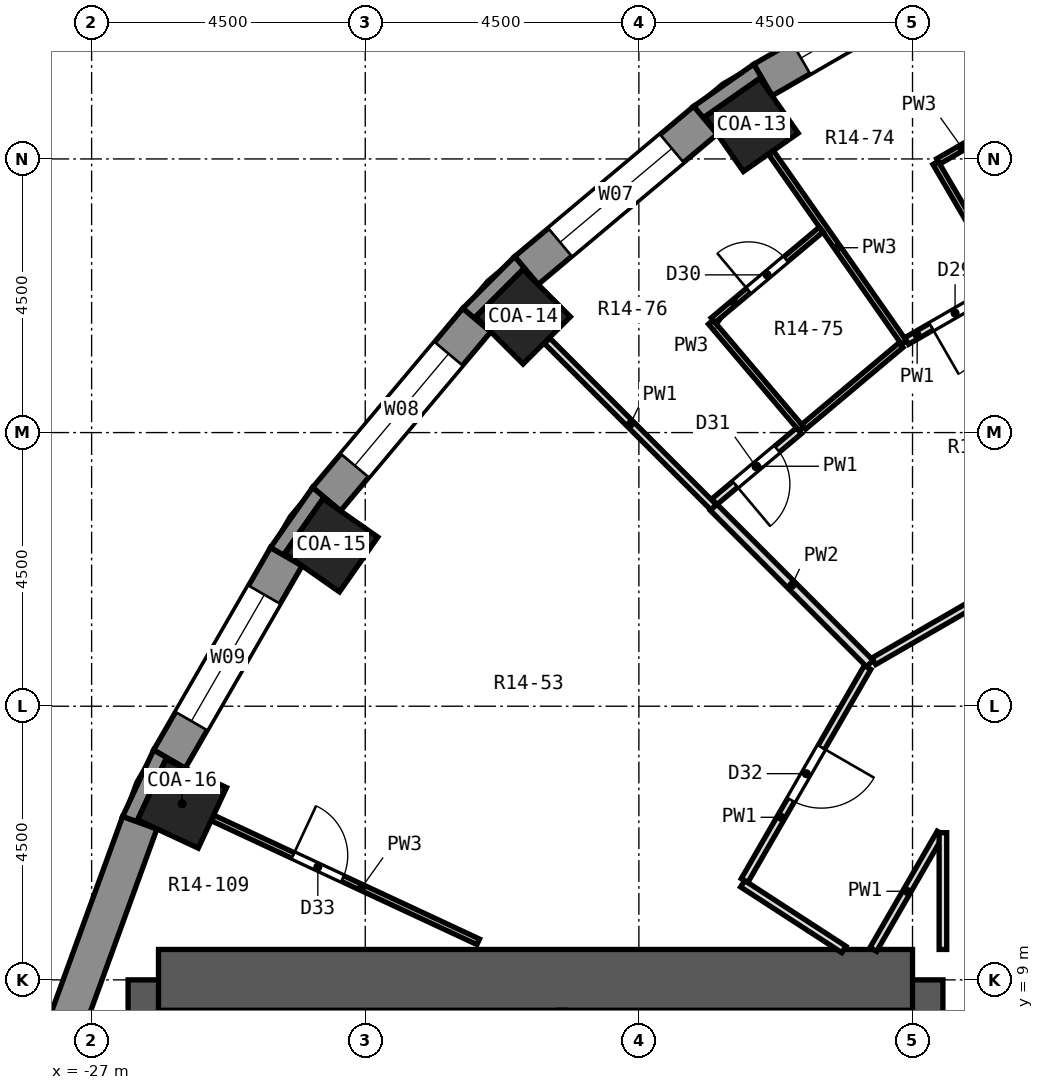
"""IFC4 building model, lengths in metres.
Left out: names, types, materials, properties, quantities, classifications, styles, units other than length and angle.
Written with IfcOpenShell. Run it as: python <this file> out.ifc"""

import sys

from ifc_helpers import new_model, si_unit, direction, frame, frame_2d, origin, origin_2d, place, context, subcontext, project, spatial, polyline, rectangle, outline, extrude, element, fill, save


model = new_model("IFC4")
c1 = context("Model", 3, precision=1e-05, world=origin(), true_north=direction((0.0, 1.0)))
c2 = subcontext(c1, "Body", "Model", "MODEL_VIEW")
j1 = project(units=[si_unit("LENGTHUNIT", "METRE"), si_unit("PLANEANGLEUNIT", "RADIAN")], contexts=[c1])
p1 = place(None, origin())
s1 = spatial("IfcSite", under=j1, at=p1, CompositionType="ELEMENT")
p2 = place(p1, origin())
s2 = spatial("IfcBuilding", under=s1, at=p2, CompositionType="ELEMENT")
p3 = place(p2, frame((0.0, 0.0, 75.8)))
s3 = spatial("IfcBuildingStorey", under=s2, at=p3, CompositionType="ELEMENT", Elevation=75.8)
for number, where, z_axis, x_axis in (
    (1, (-16.146, 23.059, 0.0), (0.0, 0.0, 1.0), (-0.574, 0.819, 0.0)),
    (2, (-19.905, 19.905, 0.0), (0.0, 0.0, 1.0), (-0.707, 0.707, 0.0)),
    (3, (-23.059, 16.146, 0.0), (0.0, 0.0, 1.0), (-0.819, 0.574, 0.0)),
    (4, (-25.512, 11.897, 0.0), (0.0, 0.0, 1.0), (-0.906, 0.423, 0.0)),
):
    element("IfcColumn", number, at=place(p3, frame(where, z_axis=z_axis, x_axis=x_axis)), inside=s3, PredefinedType="COLUMN", context=c2, shape_type="SweptSolid", body=[
        extrude(rectangle(XDim=1.1, YDim=1.1, at=origin_2d()), origin(), (0.0, 0.0, 1.0), 3.3),
    ])
p4 = place(p3, frame((-13.5, -9.0, 0.0), z_axis=(0.0, 0.0, 1.0), x_axis=(0.0, 1.0, 0.0)))
e5 = element("IfcWall", 5, at=p4, inside=s3, PredefinedType="SHEAR", context=c2, shape_type="SweptSolid", body=[
    extrude(rectangle(XDim=18.0, YDim=1.0, at=frame_2d((9.0, 0.0))), origin(), (0.0, 0.0, 1.0), 3.3),
])
p5 = place(p4, frame((15.4, 0.0, 0.0)))
e6 = element("IfcOpeningElement", 6, at=p5, cuts=e5, PredefinedType="OPENING", context=c2, shape_type="SweptSolid", body=[
    extrude(rectangle(XDim=1.2, YDim=2.1, at=frame_2d((0.6, 1.05))), frame((0.0, 0.512, 0.0), z_axis=(0.0, -1.0, 0.0), x_axis=(1.0, 0.0, 0.0)), (0.0, 0.0, 1.0), 1.024),
])
p6 = place(p4, frame((1.4, 0.0, 0.0)))
e7 = element("IfcOpeningElement", 7, at=p6, cuts=e5, PredefinedType="OPENING", context=c2, shape_type="SweptSolid", body=[
    extrude(rectangle(XDim=1.2, YDim=2.1, at=frame_2d((0.6, 1.05))), frame((0.0, 0.512, 0.0), z_axis=(0.0, -1.0, 0.0), x_axis=(1.0, 0.0, 0.0)), (0.0, 0.0, 1.0), 1.024),
])
p7 = place(p4, frame((7.5, 0.0, 0.0)))
e8 = element("IfcOpeningElement", 8, at=p7, cuts=e5, PredefinedType="OPENING", context=c2, shape_type="SweptSolid", body=[
    extrude(rectangle(XDim=3.0, YDim=2.4, at=frame_2d((1.5, 1.2))), frame((0.0, 0.512, 0.0), z_axis=(0.0, -1.0, 0.0), x_axis=(1.0, 0.0, 0.0)), (0.0, 0.0, 1.0), 1.024),
])
p8 = place(p3, frame((-25.9, -9.0, 0.0), z_axis=(0.0, 0.0, 1.0), x_axis=(0.0, 1.0, 0.0)))
e9 = element("IfcWall", 9, at=p8, inside=s3, PredefinedType="SHEAR", context=c2, shape_type="SweptSolid", body=[
    extrude(rectangle(XDim=18.0, YDim=1.0, at=frame_2d((9.0, 0.0))), origin(), (0.0, 0.0, 1.0), 3.3),
])
p9 = place(p3, frame((-13.5, 9.0, 0.0), z_axis=(0.0, 0.0, 1.0), x_axis=(-1.0, 0.0, 0.0)))
e10 = element("IfcWall", 10, at=p9, inside=s3, PredefinedType="SHEAR", context=c2, shape_type="SweptSolid", body=[
    extrude(rectangle(XDim=12.4, YDim=1.0, at=frame_2d((6.2, 0.0))), origin(), (0.0, 0.0, 1.0), 3.3),
])
p10 = place(p3, frame((-12.63, 25.721, 0.0), z_axis=(0.0, 0.0, 1.0), x_axis=(-0.86603124159, -0.499989888488, 0.0)))
e11 = element("IfcWall", 11, at=p10, inside=s3, PredefinedType="SOLIDWALL", context=c2, shape_type="SweptSolid", body=[
    extrude(rectangle(XDim=3.846, YDim=0.6, at=frame_2d((1.923, 0.0))), origin(), (0.0, 0.0, 1.0), 2.75),
])
p11 = place(p10, frame((0.723, 0.0, 0.9)))
e12 = element("IfcOpeningElement", 12, at=p11, cuts=e11, PredefinedType="OPENING", context=c2, shape_type="SweptSolid", body=[
    extrude(rectangle(XDim=2.4, YDim=1.8, at=frame_2d((1.2, 0.9))), frame((0.0, 0.312, 0.0), z_axis=(0.0, -1.0, 0.0), x_axis=(1.0, 0.0, 0.0)), (0.0, 0.0, 1.0), 0.624),
])
p12 = place(p3, frame((-16.904, 23.137, 0.0), z_axis=(0.0, 0.0, 1.0), x_axis=(-0.766026164483, -0.642809392687, 0.0)))
e13 = element("IfcWall", 13, at=p12, inside=s3, PredefinedType="SOLIDWALL", context=c2, shape_type="SweptSolid", body=[
    extrude(rectangle(XDim=3.846, YDim=0.6, at=frame_2d((1.923, 0.0))), origin(), (0.0, 0.0, 1.0), 2.75),
])
p13 = place(p12, frame((0.723, 0.0, 0.9)))
e14 = element("IfcOpeningElement", 14, at=p13, cuts=e13, PredefinedType="OPENING", context=c2, shape_type="SweptSolid", body=[
    extrude(rectangle(XDim=2.4, YDim=1.8, at=frame_2d((1.2, 0.9))), frame((0.0, 0.312, 0.0), z_axis=(0.0, -1.0, 0.0), x_axis=(1.0, 0.0, 0.0)), (0.0, 0.0, 1.0), 0.624),
])
p14 = place(p3, frame((-20.665, 19.85, 0.0), z_axis=(0.0, 0.0, 1.0), x_axis=(-0.642809392687, -0.766026164483, 0.0)))
e15 = element("IfcWall", 15, at=p14, inside=s3, PredefinedType="SOLIDWALL", context=c2, shape_type="SweptSolid", body=[
    extrude(rectangle(XDim=3.846, YDim=0.6, at=frame_2d((1.923, 0.0))), origin(), (0.0, 0.0, 1.0), 2.75),
])
p15 = place(p14, frame((0.723, 0.0, 0.9)))
e16 = element("IfcOpeningElement", 16, at=p15, cuts=e15, PredefinedType="OPENING", context=c2, shape_type="SweptSolid", body=[
    extrude(rectangle(XDim=2.4, YDim=1.8, at=frame_2d((1.2, 0.9))), frame((0.0, 0.312, 0.0), z_axis=(0.0, -1.0, 0.0), x_axis=(1.0, 0.0, 0.0)), (0.0, 0.0, 1.0), 0.624),
])
p16 = place(p3, frame((-23.798, 15.96, 0.0), z_axis=(0.0, 0.0, 1.0), x_axis=(-0.499989888488, -0.86603124159, 0.0)))
e17 = element("IfcWall", 17, at=p16, inside=s3, PredefinedType="SOLIDWALL", context=c2, shape_type="SweptSolid", body=[
    extrude(rectangle(XDim=3.846, YDim=0.6, at=frame_2d((1.923, 0.0))), origin(), (0.0, 0.0, 1.0), 2.75),
])
p17 = place(p16, frame((0.723, 0.0, 0.9)))
e18 = element("IfcOpeningElement", 18, at=p17, cuts=e17, PredefinedType="OPENING", context=c2, shape_type="SweptSolid", body=[
    extrude(rectangle(XDim=2.4, YDim=1.8, at=frame_2d((1.2, 0.9))), frame((0.0, 0.312, 0.0), z_axis=(0.0, -1.0, 0.0), x_axis=(1.0, 0.0, 0.0)), (0.0, 0.0, 1.0), 0.624),
])
p18 = place(p3, frame((-26.208, 11.585, 0.0), z_axis=(0.0, 0.0, 1.0), x_axis=(-0.342028474173, -0.939689588564, 0.0)))
e19 = element("IfcWall", 19, at=p18, inside=s3, PredefinedType="SOLIDWALL", context=c2, shape_type="SweptSolid", body=[
    extrude(rectangle(XDim=3.846, YDim=0.6, at=frame_2d((1.923, 0.0))), origin(), (0.0, 0.0, 1.0), 2.75),
])
p19 = place(p3, origin())
e20 = element("IfcWall", 20, at=p19, inside=s3, PredefinedType="SOLIDWALL", context=c2, shape_type="SweptSolid", body=[
    extrude(outline(polyline([(-16.11, 24.058), (-17.097, 23.367), (-16.711, 22.907), (-16.912, 23.194), (-16.011, 23.825), (-15.81, 23.538), (-16.11, 24.058)])), origin(), (0.0, 0.0, 1.0), 2.75),
])
p20 = place(p3, origin())
e21 = element("IfcWall", 21, at=p20, inside=s3, PredefinedType="SOLIDWALL", context=c2, shape_type="SweptSolid", body=[
    extrude(outline(polyline([(-20.895, 20.043), (-20.435, 19.657), (-20.683, 19.905), (-19.905, 20.683), (-19.657, 20.435), (-20.043, 20.895), (-20.895, 20.043)])), origin(), (0.0, 0.0, 1.0), 2.75),
])
p21 = place(p3, origin())
e22 = element("IfcWall", 22, at=p21, inside=s3, PredefinedType="SOLIDWALL", context=c2, shape_type="SweptSolid", body=[
    extrude(outline(polyline([(-23.367, 17.097), (-24.058, 16.11), (-23.538, 15.81), (-23.825, 16.011), (-23.194, 16.912), (-22.907, 16.711), (-23.367, 17.097)])), origin(), (0.0, 0.0, 1.0), 2.75),
])
p22 = place(p3, origin())
e23 = element("IfcWall", 23, at=p22, inside=s3, PredefinedType="SOLIDWALL", context=c2, shape_type="SweptSolid", body=[
    extrude(outline(polyline([(-26.49, 11.688), (-25.926, 11.483), (-26.243, 11.631), (-25.779, 12.628), (-25.461, 12.479), (-25.981, 12.78), (-26.49, 11.688)])), origin(), (0.0, 0.0, 1.0), 2.75),
])
p23 = place(p3, frame((-13.121, 22.435, 0.0), z_axis=(0.0, 0.0, 1.0), x_axis=(0.504708754908, -0.863289680651, 0.0)))
e24 = element("IfcWall", 24, at=p23, inside=s3, PredefinedType="PARTITIONING", context=c2, shape_type="SweptSolid", body=[
    extrude(rectangle(XDim=2.301, YDim=0.1, at=frame_2d((1.15, 0.0))), origin(), (0.0, 0.0, 1.0), 2.75),
])
p24 = place(p3, frame((-15.825, 22.601, 0.0), z_axis=(0.0, 0.0, 1.0), x_axis=(0.573574167811, -0.819153632733, 0.0)))
e25 = element("IfcWall", 25, at=p24, inside=s3, PredefinedType="PARTITIONING", context=c2, shape_type="SweptSolid", body=[
    extrude(rectangle(XDim=3.81, YDim=0.1, at=frame_2d((1.905, 0.0))), origin(), (0.0, 0.0, 1.0), 2.75),
])
p25 = place(p3, frame((-16.817, 19.816, 0.0), z_axis=(0.0, 0.0, 1.0), x_axis=(0.646883930741, -0.762588473653, 0.0)))
e26 = element("IfcWall", 26, at=p25, inside=s3, PredefinedType="PARTITIONING", context=c2, shape_type="SweptSolid", body=[
    extrude(rectangle(XDim=2.3, YDim=0.1, at=frame_2d((1.15, 0.0))), origin(), (0.0, 0.0, 1.0), 2.75),
])
p26 = place(p3, frame((-19.509, 19.509, 0.0), z_axis=(0.0, 0.0, 1.0), x_axis=(0.707106781187, -0.707106781187, 0.0)))
e27 = element("IfcWall", 27, at=p26, inside=s3, PredefinedType="PARTITIONING", context=c2, shape_type="SweptSolid", body=[
    extrude(rectangle(XDim=3.873, YDim=0.125, at=frame_2d((1.936, 0.0))), origin(), (0.0, 0.0, 1.0), 2.75),
])
p27 = place(p3, frame((-16.771, 16.771, 0.0), z_axis=(0.0, 0.0, 1.0), x_axis=(0.707106781187, -0.707106781187, 0.0)))
e28 = element("IfcWall", 28, at=p27, inside=s3, PredefinedType="PARTITIONING", context=c2, shape_type="SweptSolid", body=[
    extrude(rectangle(XDim=3.633, YDim=0.15, at=frame_2d((1.816, 0.0))), origin(), (0.0, 0.0, 1.0), 2.75),
])
p28 = place(p3, frame((-16.293, 10.58, 0.0), z_axis=(0.0, 0.0, 1.0), x_axis=(0.838803325008, -0.544434552499, 0.0)))
e29 = element("IfcWall", 29, at=p28, inside=s3, PredefinedType="PARTITIONING", context=c2, shape_type="SweptSolid", body=[
    extrude(rectangle(XDim=1.984, YDim=0.125, at=frame_2d((0.992, 0.0))), origin(), (0.0, 0.0, 1.0), 2.75),
])
p29 = place(p3, frame((-25.005, 11.66, 0.0), z_axis=(0.0, 0.0, 1.0), x_axis=(0.90635409516, -0.422518939442, 0.0)))
e30 = element("IfcWall", 30, at=p29, inside=s3, PredefinedType="PARTITIONING", context=c2, shape_type="SweptSolid", body=[
    extrude(rectangle(XDim=4.814, YDim=0.1, at=frame_2d((2.407, 0.0))), origin(), (0.0, 0.0, 1.0), 2.75),
])
p30 = place(p29, frame((1.453, 0.0, 0.0)))
e31 = element("IfcOpeningElement", 31, at=p30, cuts=e30, PredefinedType="OPENING", context=c2, shape_type="SweptSolid", body=[
    extrude(rectangle(XDim=0.9, YDim=2.1, at=frame_2d((0.45, 1.05))), frame((0.0, 0.062, 0.0), z_axis=(0.0, -1.0, 0.0), x_axis=(1.0, 0.0, 0.0)), (0.0, 0.0, 1.0), 0.124),
])
p31 = place(p3, frame((-13.597, 19.506, 0.0), z_axis=(0.0, 0.0, 1.0), x_axis=(0.866538954681, 0.499109446936, 0.0)))
e32 = element("IfcWall", 32, at=p31, inside=s3, PredefinedType="PARTITIONING", context=c2, shape_type="SweptSolid", body=[
    extrude(rectangle(XDim=1.839, YDim=0.125, at=frame_2d((0.919, 0.0))), origin(), (0.0, 0.0, 1.0), 2.75),
])
p32 = place(p31, frame((0.47, 0.0, 0.0)))
e33 = element("IfcOpeningElement", 33, at=p32, cuts=e32, PredefinedType="OPENING", context=c2, shape_type="SweptSolid", body=[
    extrude(rectangle(XDim=0.9, YDim=2.1, at=frame_2d((0.45, 1.05))), frame((0.0, 0.074, 0.0), z_axis=(0.0, -1.0, 0.0), x_axis=(1.0, 0.0, 0.0)), (0.0, 0.0, 1.0), 0.149),
])
p33 = place(p3, frame((-14.137, 14.24, 0.0), z_axis=(0.0, 0.0, 1.0), x_axis=(0.866045301435, 0.499965534674, 0.0)))
e34 = element("IfcWall", 34, at=p33, inside=s3, PredefinedType="PARTITIONING", context=c2, shape_type="SweptSolid", body=[
    extrude(rectangle(XDim=10.259, YDim=0.125, at=frame_2d((5.129, 0.0))), origin(), (0.0, 0.0, 1.0), 2.75),
])
p34 = place(p3, frame((-13.078, 22.46, 0.0), z_axis=(0.0, 0.0, 1.0), x_axis=(0.865947141423, 0.500135529893, 0.0)))
e35 = element("IfcWall", 35, at=p34, inside=s3, PredefinedType="PARTITIONING", context=c2, shape_type="SweptSolid", body=[
    extrude(rectangle(XDim=2.319, YDim=0.1, at=frame_2d((1.16, 0.0))), origin(), (0.0, 0.0, 1.0), 2.75),
])
p35 = place(p34, frame((0.76, 0.0, 0.0)))
e36 = element("IfcOpeningElement", 36, at=p35, cuts=e35, PredefinedType="OPENING", context=c2, shape_type="SweptSolid", body=[
    extrude(rectangle(XDim=0.8, YDim=2.1, at=frame_2d((0.4, 1.05))), frame((0.0, 0.062, 0.0), z_axis=(0.0, -1.0, 0.0), x_axis=(1.0, 0.0, 0.0)), (0.0, 0.0, 1.0), 0.124),
])
p36 = place(p3, frame((-15.291, 18.094, 0.0), z_axis=(0.0, 0.0, 1.0), x_axis=(0.765911671875, 0.642945807114, 0.0)))
e37 = element("IfcWall", 37, at=p36, inside=s3, PredefinedType="PARTITIONING", context=c2, shape_type="SweptSolid", body=[
    extrude(rectangle(XDim=2.093, YDim=0.1, at=frame_2d((1.046, 0.0))), origin(), (0.0, 0.0, 1.0), 2.75),
])
p37 = place(p3, frame((-16.758, 16.863, 0.0), z_axis=(0.0, 0.0, 1.0), x_axis=(0.766088979655, 0.642734529375, 0.0)))
e38 = element("IfcWall", 38, at=p37, inside=s3, PredefinedType="PARTITIONING", context=c2, shape_type="SweptSolid", body=[
    extrude(rectangle(XDim=1.815, YDim=0.125, at=frame_2d((0.907, 0.0))), origin(), (0.0, 0.0, 1.0), 2.75),
])
p38 = place(p37, frame((0.445, 0.0, 0.0)))
e39 = element("IfcOpeningElement", 39, at=p38, cuts=e38, PredefinedType="OPENING", context=c2, shape_type="SweptSolid", body=[
    extrude(rectangle(XDim=0.9, YDim=2.1, at=frame_2d((0.45, 1.05))), frame((0.0, 0.074, 0.0), z_axis=(0.0, -1.0, 0.0), x_axis=(1.0, 0.0, 0.0)), (0.0, 0.0, 1.0), 0.149),
])
p39 = place(p3, frame((-16.779, 19.848, 0.0), z_axis=(0.0, 0.0, 1.0), x_axis=(0.766051078848, 0.642779701449, 0.0)))
e40 = element("IfcWall", 40, at=p39, inside=s3, PredefinedType="PARTITIONING", context=c2, shape_type="SweptSolid", body=[
    extrude(rectangle(XDim=2.319, YDim=0.1, at=frame_2d((1.16, 0.0))), origin(), (0.0, 0.0, 1.0), 2.75),
])
p40 = place(p39, frame((0.76, 0.0, 0.0)))
e41 = element("IfcOpeningElement", 41, at=p40, cuts=e40, PredefinedType="OPENING", context=c2, shape_type="SweptSolid", body=[
    extrude(rectangle(XDim=0.8, YDim=2.1, at=frame_2d((0.4, 1.05))), frame((0.0, 0.062, 0.0), z_axis=(0.0, -1.0, 0.0), x_axis=(1.0, 0.0, 0.0)), (0.0, 0.0, 1.0), 0.124),
])
p41 = place(p3, frame((-14.145, 9.5, 0.0), z_axis=(0.0, 0.0, 1.0), x_axis=(0.500012531179, 0.866018168784, 0.0)))
e42 = element("IfcWall", 42, at=p41, inside=s3, PredefinedType="PARTITIONING", context=c2, shape_type="SweptSolid", body=[
    extrude(rectangle(XDim=2.21, YDim=0.125, at=frame_2d((1.105, 0.0))), origin(), (0.0, 0.0, 1.0), 2.75),
])
p42 = place(p3, frame((-16.262, 10.634, 0.0), z_axis=(0.0, 0.0, 1.0), x_axis=(0.499962802816, 0.866046878523, 0.0)))
e43 = element("IfcWall", 43, at=p42, inside=s3, PredefinedType="PARTITIONING", context=c2, shape_type="SweptSolid", body=[
    extrude(rectangle(XDim=4.045, YDim=0.125, at=frame_2d((2.022, 0.0))), origin(), (0.0, 0.0, 1.0), 2.75),
])
p43 = place(p42, frame((1.529, 0.0, 0.0)))
e44 = element("IfcOpeningElement", 44, at=p43, cuts=e43, PredefinedType="OPENING", context=c2, shape_type="SweptSolid", body=[
    extrude(rectangle(XDim=1.0, YDim=2.1, at=frame_2d((0.5, 1.05))), frame((0.0, 0.074, 0.0), z_axis=(0.0, -1.0, 0.0), x_axis=(1.0, 0.0, 0.0)), (0.0, 0.0, 1.0), 0.149),
])
p44 = place(p3, frame((-13.0, 9.5, 0.0), z_axis=(0.0, 0.0, 1.0), x_axis=(0.0, 1.0, 0.0)))
e45 = element("IfcWall", 45, at=p44, inside=s3, PredefinedType="PARTITIONING", context=c2, shape_type="SweptSolid", body=[
    extrude(rectangle(XDim=1.92, YDim=0.125, at=frame_2d((0.96, 0.0))), origin(), (0.0, 0.0, 1.0), 2.75),
])
p45 = place(p3, frame((-19.27, 5.3, 0.0), z_axis=(0.0, 0.0, 1.0), x_axis=(0.0, 1.0, 0.0)))
e46 = element("IfcWall", 46, at=p45, inside=s3, PredefinedType="PARTITIONING", context=c2, shape_type="SweptSolid", body=[
    extrude(rectangle(XDim=3.2, YDim=0.1, at=frame_2d((1.6, 0.0))), origin(), (0.0, 0.0, 1.0), 2.75),
])
p46 = place(p11, origin())
e47 = element("IfcWindow", 47, at=p46, inside=s3, PartitioningType="SINGLE_PANEL", PredefinedType="WINDOW", context=c2, shape_type="SweptSolid", body=[
    extrude(rectangle(XDim=2.4, YDim=1.8, at=frame_2d((1.2, 0.9))), frame((0.0, 0.18, 0.0), z_axis=(0.0, -1.0, 0.0), x_axis=(1.0, 0.0, 0.0)), (0.0, 0.0, 1.0), 0.06),
])
fill(e12, e47)
p47 = place(p13, origin())
e48 = element("IfcWindow", 48, at=p47, inside=s3, PartitioningType="SINGLE_PANEL", PredefinedType="WINDOW", context=c2, shape_type="SweptSolid", body=[
    extrude(rectangle(XDim=2.4, YDim=1.8, at=frame_2d((1.2, 0.9))), frame((0.0, 0.18, 0.0), z_axis=(0.0, -1.0, 0.0), x_axis=(1.0, 0.0, 0.0)), (0.0, 0.0, 1.0), 0.06),
])
fill(e14, e48)
p48 = place(p15, origin())
e49 = element("IfcWindow", 49, at=p48, inside=s3, PartitioningType="SINGLE_PANEL", PredefinedType="WINDOW", context=c2, shape_type="SweptSolid", body=[
    extrude(rectangle(XDim=2.4, YDim=1.8, at=frame_2d((1.2, 0.9))), frame((0.0, 0.18, 0.0), z_axis=(0.0, -1.0, 0.0), x_axis=(1.0, 0.0, 0.0)), (0.0, 0.0, 1.0), 0.06),
])
fill(e16, e49)
p49 = place(p17, origin())
e50 = element("IfcWindow", 50, at=p49, inside=s3, PartitioningType="SINGLE_PANEL", PredefinedType="WINDOW", context=c2, shape_type="SweptSolid", body=[
    extrude(rectangle(XDim=2.4, YDim=1.8, at=frame_2d((1.2, 0.9))), frame((0.0, 0.18, 0.0), z_axis=(0.0, -1.0, 0.0), x_axis=(1.0, 0.0, 0.0)), (0.0, 0.0, 1.0), 0.06),
])
fill(e18, e50)
p50 = place(p32, frame((0.9, 0.0, 0.0), z_axis=(0.0, 0.0, 1.0), x_axis=(-1.0, 0.0, 0.0)))
e51 = element("IfcDoor", 51, at=p50, inside=s3, OperationType="SINGLE_SWING_RIGHT", PredefinedType="DOOR", context=c2, shape_type="SweptSolid", body=[
    extrude(rectangle(XDim=0.9, YDim=2.1, at=frame_2d((0.45, 1.05))), frame((0.0, 0.025, 0.0), z_axis=(0.0, -1.0, 0.0), x_axis=(1.0, 0.0, 0.0)), (0.0, 0.0, 1.0), 0.05),
])
fill(e33, e51)
p51 = place(p40, origin())
e52 = element("IfcDoor", 52, at=p51, inside=s3, OperationType="SINGLE_SWING_LEFT", PredefinedType="DOOR", context=c2, shape_type="SweptSolid", body=[
    extrude(rectangle(XDim=0.8, YDim=2.1, at=frame_2d((0.4, 1.05))), frame((0.0, 0.025, 0.0), z_axis=(0.0, -1.0, 0.0), x_axis=(1.0, 0.0, 0.0)), (0.0, 0.0, 1.0), 0.05),
])
fill(e41, e52)
p52 = place(p38, frame((0.9, 0.0, 0.0), z_axis=(0.0, 0.0, 1.0), x_axis=(-1.0, 0.0, 0.0)))
e53 = element("IfcDoor", 53, at=p52, inside=s3, OperationType="SINGLE_SWING_RIGHT", PredefinedType="DOOR", context=c2, shape_type="SweptSolid", body=[
    extrude(rectangle(XDim=0.9, YDim=2.1, at=frame_2d((0.45, 1.05))), frame((0.0, 0.025, 0.0), z_axis=(0.0, -1.0, 0.0), x_axis=(1.0, 0.0, 0.0)), (0.0, 0.0, 1.0), 0.05),
])
fill(e39, e53)
p53 = place(p43, frame((1.0, 0.0, 0.0), z_axis=(0.0, 0.0, 1.0), x_axis=(-1.0, 0.0, 0.0)))
e54 = element("IfcDoor", 54, at=p53, inside=s3, OperationType="SINGLE_SWING_LEFT", PredefinedType="DOOR", context=c2, shape_type="SweptSolid", body=[
    extrude(rectangle(XDim=1.0, YDim=2.1, at=frame_2d((0.5, 1.05))), frame((0.0, 0.025, 0.0), z_axis=(0.0, -1.0, 0.0), x_axis=(1.0, 0.0, 0.0)), (0.0, 0.0, 1.0), 0.05),
])
fill(e44, e54)
p54 = place(p30, origin())
e55 = element("IfcDoor", 55, at=p54, inside=s3, OperationType="SINGLE_SWING_LEFT", PredefinedType="DOOR", context=c2, shape_type="SweptSolid", body=[
    extrude(rectangle(XDim=0.9, YDim=2.1, at=frame_2d((0.45, 1.05))), frame((0.0, 0.025, 0.0), z_axis=(0.0, -1.0, 0.0), x_axis=(1.0, 0.0, 0.0)), (0.0, 0.0, 1.0), 0.05),
])
fill(e31, e55)
save(model, sys.argv[1])
